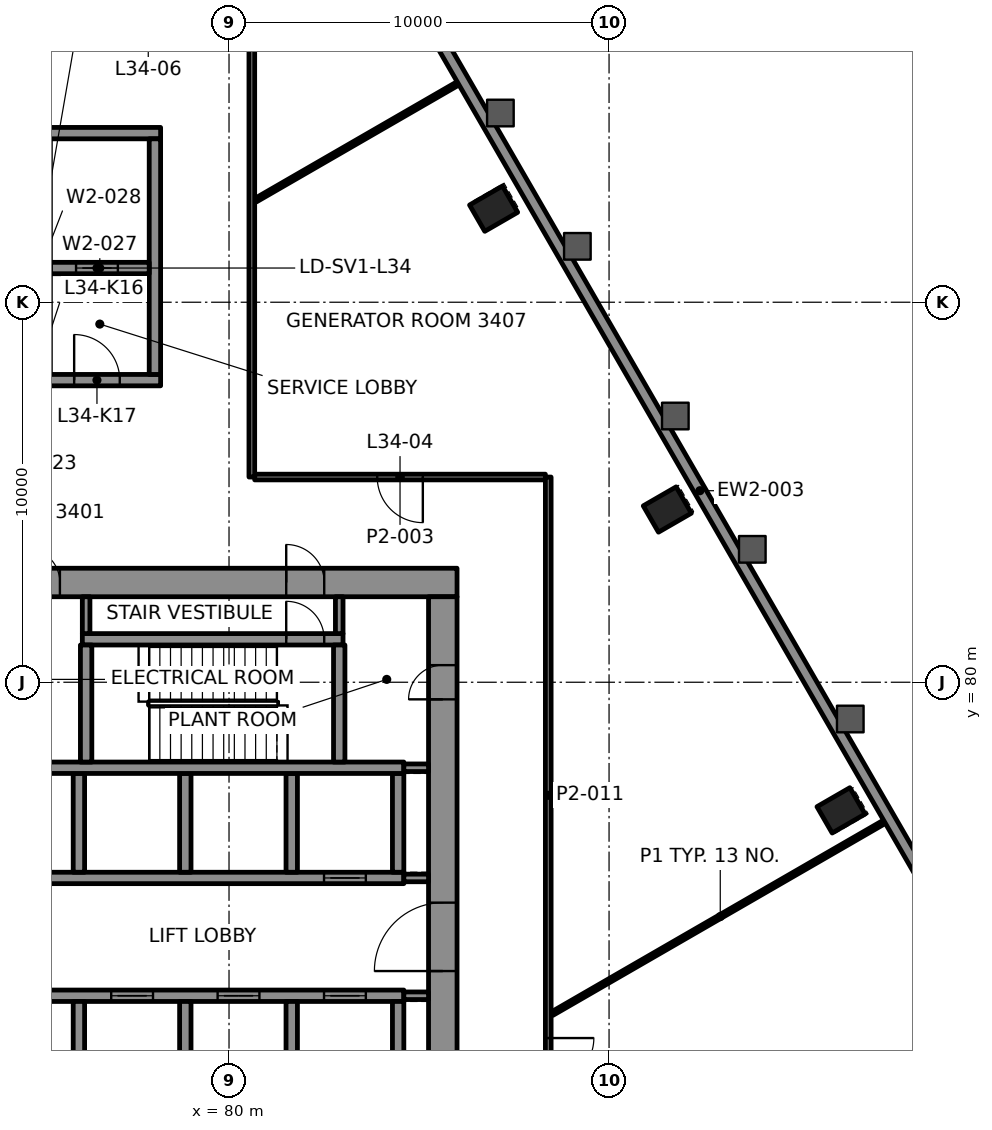
"""IFC4 building model, lengths in metres.
Left out: names, types, materials, properties, quantities, classifications, styles, units other than length and angle.
Written with IfcOpenShell. Run it as: python <this file> out.ifc"""

import sys

from ifc_helpers import new_model, si_unit, direction, frame, frame_2d, origin, origin_2d, place, context, subcontext, project, spatial, rectangle, hollow_rectangle, extrude, element, fill, save


model = new_model("IFC4")
c1 = context("Model", 3, precision=1e-05, world=origin(), true_north=direction((0.0, 1.0)))
c2 = subcontext(c1, "Body", "Model", "MODEL_VIEW")
j1 = project(units=[si_unit("LENGTHUNIT", "METRE"), si_unit("PLANEANGLEUNIT", "RADIAN")], contexts=[c1])
p1 = place(None, origin())
s1 = spatial("IfcSite", under=j1, at=p1, CompositionType="ELEMENT")
p2 = place(p1, origin())
s2 = spatial("IfcBuilding", under=s1, at=p2, CompositionType="ELEMENT")
p3 = place(p2, frame((0.0, 0.0, 151.3)))
s3 = spatial("IfcBuildingStorey", under=s2, at=p3, CompositionType="ELEMENT", Elevation=151.3)
for number, where, z_axis, x_axis in (
    (1, (96.104, 76.628, -0.0), (0.0, 0.0, 1.0), (-0.5, 0.866, 0.0)),
    (2, (91.533, 84.545, -0.0), (0.0, 0.0, 1.0), (-0.5, 0.866, 0.0)),
    (3, (86.962, 92.462, -0.0), (0.0, 0.0, 1.0), (-0.5, 0.866, 0.0)),
):
    element("IfcColumn", number, at=place(p3, frame(where, z_axis=z_axis, x_axis=x_axis)), inside=s3, PredefinedType="COLUMN", context=c2, shape_type="SweptSolid", body=[
        extrude(hollow_rectangle(XDim=0.8, YDim=1.0, WallThickness=0.05, at=origin_2d()), origin(), (0.0, 0.0, 1.0), 4.5),
    ])
p4 = place(p3, frame((64.0, 82.625, 0.0), z_axis=(0.0, 0.0, 1.0), x_axis=(1.0, 0.0, 0.0)))
e4 = element("IfcWall", 4, at=p4, inside=s3, PredefinedType="SHEAR", context=c2, shape_type="SweptSolid", body=[
    extrude(rectangle(XDim=22.0, YDim=0.75, at=frame_2d((11.0, 0.0))), origin(), (0.0, 0.0, 1.0), 4.3),
])
p5 = place(p4, frame((3.695, 0.0, 0.0)))
e5 = element("IfcOpeningElement", 5, at=p5, cuts=e4, PredefinedType="OPENING", context=c2, shape_type="SweptSolid", body=[
    extrude(rectangle(XDim=1.0, YDim=2.1, at=frame_2d((0.5, 1.05))), frame((0.0, 0.385, 0.0), z_axis=(0.0, -1.0, 0.0), x_axis=(1.0, 0.0, 0.0)), (0.0, 0.0, 1.0), 0.77),
])
p6 = place(p4, frame((17.505, 0.0, 0.0)))
e6 = element("IfcOpeningElement", 6, at=p6, cuts=e4, PredefinedType="OPENING", context=c2, shape_type="SweptSolid", body=[
    extrude(rectangle(XDim=1.0, YDim=2.1, at=frame_2d((0.5, 1.05))), frame((0.0, 0.385, 0.0), z_axis=(0.0, -1.0, 0.0), x_axis=(1.0, 0.0, 0.0)), (0.0, 0.0, 1.0), 0.77),
])
p7 = place(p4, frame((10.65, 0.0, 0.0)))
e7 = element("IfcOpeningElement", 7, at=p7, cuts=e4, PredefinedType="OPENING", context=c2, shape_type="SweptSolid", body=[
    extrude(rectangle(XDim=0.9, YDim=2.1, at=frame_2d((0.45, 1.05))), frame((0.0, 0.385, 0.0), z_axis=(0.0, -1.0, 0.0), x_axis=(1.0, 0.0, 0.0)), (0.0, 0.0, 1.0), 0.77),
])
p8 = place(p3, frame((85.625, 67.75, 0.0), z_axis=(0.0, 0.0, 1.0), x_axis=(0.0, 1.0, 0.0)))
e8 = element("IfcWall", 8, at=p8, inside=s3, PredefinedType="SHEAR", context=c2, shape_type="SweptSolid", body=[
    extrude(rectangle(XDim=14.5, YDim=0.75, at=frame_2d((7.25, 0.0))), origin(), (0.0, 0.0, 1.0), 4.3),
])
p9 = place(p8, frame((4.65, 0.0, 0.0)))
e9 = element("IfcOpeningElement", 9, at=p9, cuts=e8, PredefinedType="OPENING", context=c2, shape_type="SweptSolid", body=[
    extrude(rectangle(XDim=1.8, YDim=2.1, at=frame_2d((0.9, 1.05))), frame((0.0, 0.385, 0.0), z_axis=(0.0, -1.0, 0.0), x_axis=(1.0, 0.0, 0.0)), (0.0, 0.0, 1.0), 0.77),
])
p10 = place(p8, frame((11.8, 0.0, 0.0)))
e10 = element("IfcOpeningElement", 10, at=p10, cuts=e8, PredefinedType="OPENING", context=c2, shape_type="SweptSolid", body=[
    extrude(rectangle(XDim=0.9, YDim=2.1, at=frame_2d((0.45, 1.05))), frame((0.0, 0.385, 0.0), z_axis=(0.0, -1.0, 0.0), x_axis=(1.0, 0.0, 0.0)), (0.0, 0.0, 1.0), 0.77),
])
p11 = place(p3, frame((70.3, 71.75, 0.0), z_axis=(0.0, 0.0, 1.0), x_axis=(1.0, 0.0, 0.0)))
e11 = element("IfcWall", 11, at=p11, inside=s3, PredefinedType="SHEAR", context=c2, shape_type="SweptSolid", body=[
    extrude(rectangle(XDim=14.3, YDim=0.3, at=frame_2d((7.15, 0.0))), origin(), (0.0, 0.0, 1.0), 4.3),
])
p12 = place(p11, frame((1.0, 0.0, 0.0)))
e12 = element("IfcOpeningElement", 12, at=p12, cuts=e11, PredefinedType="OPENING", context=c2, shape_type="SweptSolid", body=[
    extrude(rectangle(XDim=1.1, YDim=2.1, at=frame_2d((0.55, 1.05))), frame((0.0, 0.16, 0.0), z_axis=(0.0, -1.0, 0.0), x_axis=(1.0, 0.0, 0.0)), (0.0, 0.0, 1.0), 0.32),
])
p13 = place(p11, frame((3.8, 0.0, 0.0)))
e13 = element("IfcOpeningElement", 13, at=p13, cuts=e11, PredefinedType="OPENING", context=c2, shape_type="SweptSolid", body=[
    extrude(rectangle(XDim=1.1, YDim=2.1, at=frame_2d((0.55, 1.05))), frame((0.0, 0.16, 0.0), z_axis=(0.0, -1.0, 0.0), x_axis=(1.0, 0.0, 0.0)), (0.0, 0.0, 1.0), 0.32),
])
p14 = place(p11, frame((6.6, 0.0, 0.0)))
e14 = element("IfcOpeningElement", 14, at=p14, cuts=e11, PredefinedType="OPENING", context=c2, shape_type="SweptSolid", body=[
    extrude(rectangle(XDim=1.1, YDim=2.1, at=frame_2d((0.55, 1.05))), frame((0.0, 0.16, 0.0), z_axis=(0.0, -1.0, 0.0), x_axis=(1.0, 0.0, 0.0)), (0.0, 0.0, 1.0), 0.32),
])
p15 = place(p11, frame((9.4, 0.0, 0.0)))
e15 = element("IfcOpeningElement", 15, at=p15, cuts=e11, PredefinedType="OPENING", context=c2, shape_type="SweptSolid", body=[
    extrude(rectangle(XDim=1.1, YDim=2.1, at=frame_2d((0.55, 1.05))), frame((0.0, 0.16, 0.0), z_axis=(0.0, -1.0, 0.0), x_axis=(1.0, 0.0, 0.0)), (0.0, 0.0, 1.0), 0.32),
])
p16 = place(p11, frame((12.2, 0.0, 0.0)))
e16 = element("IfcOpeningElement", 16, at=p16, cuts=e11, PredefinedType="OPENING", context=c2, shape_type="SweptSolid", body=[
    extrude(rectangle(XDim=1.1, YDim=2.1, at=frame_2d((0.55, 1.05))), frame((0.0, 0.16, 0.0), z_axis=(0.0, -1.0, 0.0), x_axis=(1.0, 0.0, 0.0)), (0.0, 0.0, 1.0), 0.32),
])
p17 = place(p3, frame((70.3, 74.85, 0.0), z_axis=(0.0, 0.0, 1.0), x_axis=(1.0, 0.0, 0.0)))
e17 = element("IfcWall", 17, at=p17, inside=s3, PredefinedType="SHEAR", context=c2, shape_type="SweptSolid", body=[
    extrude(rectangle(XDim=14.3, YDim=0.3, at=frame_2d((7.15, 0.0))), origin(), (0.0, 0.0, 1.0), 4.3),
])
p18 = place(p17, frame((3.8, 0.0, 0.0)))
e18 = element("IfcOpeningElement", 18, at=p18, cuts=e17, PredefinedType="OPENING", context=c2, shape_type="SweptSolid", body=[
    extrude(rectangle(XDim=1.1, YDim=2.1, at=frame_2d((0.55, 1.05))), frame((0.0, 0.16, 0.0), z_axis=(0.0, -1.0, 0.0), x_axis=(1.0, 0.0, 0.0)), (0.0, 0.0, 1.0), 0.32),
])
p19 = place(p17, frame((12.2, 0.0, 0.0)))
e19 = element("IfcOpeningElement", 19, at=p19, cuts=e17, PredefinedType="OPENING", context=c2, shape_type="SweptSolid", body=[
    extrude(rectangle(XDim=1.1, YDim=2.1, at=frame_2d((0.55, 1.05))), frame((0.0, 0.16, 0.0), z_axis=(0.0, -1.0, 0.0), x_axis=(1.0, 0.0, 0.0)), (0.0, 0.0, 1.0), 0.32),
])
for number, where, z_axis, x_axis in (
    (20, (76.05, 69.0, 0.0), (0.0, 0.0, 1.0), (0.0, 1.0, 0.0)),
    (21, (76.05, 75.0, 0.0), (0.0, 0.0, 1.0), (0.0, 1.0, 0.0)),
    (22, (78.85, 69.0, 0.0), (0.0, 0.0, 1.0), (0.0, 1.0, 0.0)),
    (23, (78.85, 75.0, 0.0), (0.0, 0.0, 1.0), (0.0, 1.0, 0.0)),
    (24, (81.65, 69.0, 0.0), (0.0, 0.0, 1.0), (0.0, 1.0, 0.0)),
    (25, (81.65, 75.0, 0.0), (0.0, 0.0, 1.0), (0.0, 1.0, 0.0)),
    (26, (84.45, 69.0, 0.0), (0.0, 0.0, 1.0), (0.0, 1.0, 0.0)),
    (27, (84.45, 75.0, 0.0), (0.0, 0.0, 1.0), (0.0, 1.0, 0.0)),
):
    element("IfcWall", number, at=place(p3, frame(where, z_axis=z_axis, x_axis=x_axis)), inside=s3, PredefinedType="SHEAR", context=c2, shape_type="SweptSolid", body=[
        extrude(rectangle(XDim=2.6, YDim=0.3, at=frame_2d((1.3, 0.0))), origin(), (0.0, 0.0, 1.0), 4.3),
    ])
p20 = place(p3, frame((67.15, 77.75, 0.0), z_axis=(0.0, 0.0, 1.0), x_axis=(1.0, 0.0, 0.0)))
e28 = element("IfcWall", 28, at=p20, inside=s3, PredefinedType="SHEAR", context=c2, shape_type="SweptSolid", body=[
    extrude(rectangle(XDim=17.45, YDim=0.3, at=frame_2d((8.725, 0.0))), origin(), (0.0, 0.0, 1.0), 4.3),
])
p21 = place(p20, frame((0.545, 0.0, 0.0)))
e29 = element("IfcOpeningElement", 29, at=p21, cuts=e28, PredefinedType="OPENING", context=c2, shape_type="SweptSolid", body=[
    extrude(rectangle(XDim=1.0, YDim=2.1, at=frame_2d((0.5, 1.05))), frame((0.0, 0.16, 0.0), z_axis=(0.0, -1.0, 0.0), x_axis=(1.0, 0.0, 0.0)), (0.0, 0.0, 1.0), 0.32),
])
p22 = place(p3, frame((76.14, 81.13, 0.0), z_axis=(0.0, 0.0, 1.0), x_axis=(1.0, 0.0, 0.0)))
e30 = element("IfcWall", 30, at=p22, inside=s3, PredefinedType="SHEAR", context=c2, shape_type="SweptSolid", body=[
    extrude(rectangle(XDim=6.86, YDim=0.3, at=frame_2d((3.43, 0.0))), origin(), (0.0, 0.0, 1.0), 4.3),
])
p23 = place(p22, frame((5.365, 0.0, 0.0)))
e31 = element("IfcOpeningElement", 31, at=p23, cuts=e30, PredefinedType="OPENING", context=c2, shape_type="SweptSolid", body=[
    extrude(rectangle(XDim=1.0, YDim=2.1, at=frame_2d((0.5, 1.05))), frame((0.0, 0.16, 0.0), z_axis=(0.0, -1.0, 0.0), x_axis=(1.0, 0.0, 0.0)), (0.0, 0.0, 1.0), 0.32),
])
for number, where, z_axis, x_axis in (
    (32, (76.24, 77.9, 0.0), (0.0, 0.0, 1.0), (0.0, 1.0, 0.0)),
    (33, (82.9, 77.9, 0.0), (0.0, 0.0, 1.0), (0.0, 1.0, 0.0)),
):
    element("IfcWall", number, at=place(p3, frame(where, z_axis=z_axis, x_axis=x_axis)), inside=s3, PredefinedType="SHEAR", context=c2, shape_type="SweptSolid", body=[
        extrude(rectangle(XDim=3.08, YDim=0.3, at=frame_2d((1.54, 0.0))), origin(), (0.0, 0.0, 1.0), 4.3),
    ])
p24 = place(p3, frame((71.8, 87.95, 0.0), z_axis=(0.0, 0.0, 1.0), x_axis=(1.0, 0.0, 0.0)))
e34 = element("IfcWall", 34, at=p24, inside=s3, PredefinedType="SHEAR", context=c2, shape_type="SweptSolid", body=[
    extrude(rectangle(XDim=6.4, YDim=0.3, at=frame_2d((3.2, 0.0))), origin(), (0.0, 0.0, 1.0), 4.3),
])
p25 = place(p24, frame((1.325, 0.0, 0.0)))
e35 = element("IfcOpeningElement", 35, at=p25, cuts=e34, PredefinedType="OPENING", context=c2, shape_type="SweptSolid", body=[
    extrude(rectangle(XDim=1.0, YDim=2.1, at=frame_2d((0.5, 1.05))), frame((0.0, 0.16, 0.0), z_axis=(0.0, -1.0, 0.0), x_axis=(1.0, 0.0, 0.0)), (0.0, 0.0, 1.0), 0.32),
])
p26 = place(p24, frame((4.125, 0.0, 0.0)))
e36 = element("IfcOpeningElement", 36, at=p26, cuts=e34, PredefinedType="OPENING", context=c2, shape_type="SweptSolid", body=[
    extrude(rectangle(XDim=1.2, YDim=2.1, at=frame_2d((0.6, 1.05))), frame((0.0, 0.16, 0.0), z_axis=(0.0, -1.0, 0.0), x_axis=(1.0, 0.0, 0.0)), (0.0, 0.0, 1.0), 0.32),
])
p27 = place(p3, frame((71.8, 94.45, 0.0), z_axis=(0.0, 0.0, 1.0), x_axis=(1.0, 0.0, 0.0)))
e37 = element("IfcWall", 37, at=p27, inside=s3, PredefinedType="SHEAR", context=c2, shape_type="SweptSolid", body=[
    extrude(rectangle(XDim=6.4, YDim=0.3, at=frame_2d((3.2, 0.0))), origin(), (0.0, 0.0, 1.0), 4.3),
])
p28 = place(p3, frame((78.05, 88.1, 0.0), z_axis=(0.0, 0.0, 1.0), x_axis=(0.0, 1.0, 0.0)))
e38 = element("IfcWall", 38, at=p28, inside=s3, PredefinedType="SHEAR", context=c2, shape_type="SweptSolid", body=[
    extrude(rectangle(XDim=6.2, YDim=0.3, at=frame_2d((3.1, 0.0))), origin(), (0.0, 0.0, 1.0), 4.3),
])
p29 = place(p3, frame((75.3, 90.9, 0.0), z_axis=(0.0, 0.0, 1.0), x_axis=(1.0, 0.0, 0.0)))
e39 = element("IfcWall", 39, at=p29, inside=s3, PredefinedType="SHEAR", context=c2, shape_type="SweptSolid", body=[
    extrude(rectangle(XDim=2.6, YDim=0.3, at=frame_2d((1.3, 0.0))), origin(), (0.0, 0.0, 1.0), 4.3),
])
p30 = place(p29, frame((0.675, 0.0, 0.0)))
e40 = element("IfcOpeningElement", 40, at=p30, cuts=e39, PredefinedType="OPENING", context=c2, shape_type="SweptSolid", body=[
    extrude(rectangle(XDim=1.1, YDim=2.1, at=frame_2d((0.55, 1.05))), frame((0.0, 0.16, 0.0), z_axis=(0.0, -1.0, 0.0), x_axis=(1.0, 0.0, 0.0)), (0.0, 0.0, 1.0), 0.32),
])
p31 = place(p3, frame((88.324, 85.4, 0.0), z_axis=(0.0, 0.0, 1.0), x_axis=(-1.0, 0.0, 0.0)))
e41 = element("IfcWall", 41, at=p31, inside=s3, PredefinedType="PARTITIONING", context=c2, shape_type="SweptSolid", body=[
    extrude(rectangle(XDim=7.649, YDim=0.15, at=frame_2d((3.825, 0.0))), origin(), (0.0, 0.0, 1.0), 3.7),
])
p32 = place(p31, frame((3.225, 0.0, 0.0)))
e42 = element("IfcOpeningElement", 42, at=p32, cuts=e41, PredefinedType="OPENING", context=c2, shape_type="SweptSolid", body=[
    extrude(rectangle(XDim=1.2, YDim=2.1, at=frame_2d((0.6, 1.05))), frame((0.0, 0.085, 0.0), z_axis=(0.0, -1.0, 0.0), x_axis=(1.0, 0.0, 0.0)), (0.0, 0.0, 1.0), 0.17),
])
p33 = place(p3, frame((88.501, 71.279, 0.0), z_axis=(0.0, 0.0, 1.0), x_axis=(0.866018885385, 0.500011290028, 0.0)))
e43 = element("IfcWall", 43, at=p33, inside=s3, PredefinedType="PARTITIONING", context=c2, shape_type="SweptSolid", body=[
    extrude(rectangle(XDim=10.219, YDim=0.1, at=frame_2d((5.109, 0.0))), origin(), (0.0, 0.0, 1.0), 3.7),
])
p34 = place(p3, frame((80.701, 92.686, 0.0), z_axis=(0.0, 0.0, 1.0), x_axis=(0.866025438137, 0.4999999405, 0.0)))
e44 = element("IfcWall", 44, at=p34, inside=s3, PredefinedType="PARTITIONING", context=c2, shape_type="SweptSolid", body=[
    extrude(rectangle(XDim=6.271, YDim=0.1, at=frame_2d((3.135, 0.0))), origin(), (0.0, 0.0, 1.0), 3.7),
])
p35 = place(p3, frame((88.4, 85.399, 0.0), z_axis=(0.0, 0.0, 1.0), x_axis=(0.0, -1.0, 0.0)))
e45 = element("IfcWall", 45, at=p35, inside=s3, PredefinedType="PARTITIONING", context=c2, shape_type="SweptSolid", body=[
    extrude(rectangle(XDim=16.75, YDim=0.15, at=frame_2d((8.375, 0.0))), origin(), (0.0, 0.0, 1.0), 3.7),
])
p36 = place(p35, frame((14.763, 0.0, 0.0)))
e46 = element("IfcOpeningElement", 46, at=p36, cuts=e45, PredefinedType="OPENING", context=c2, shape_type="SweptSolid", body=[
    extrude(rectangle(XDim=1.2, YDim=2.1, at=frame_2d((0.6, 1.05))), frame((0.0, 0.085, 0.0), z_axis=(0.0, -1.0, 0.0), x_axis=(1.0, 0.0, 0.0)), (0.0, 0.0, 1.0), 0.17),
])
p37 = place(p3, frame((80.6, 85.4, 0.0), z_axis=(0.0, 0.0, 1.0), x_axis=(0.0, 1.0, 0.0)))
e47 = element("IfcWall", 47, at=p37, inside=s3, PredefinedType="PARTITIONING", context=c2, shape_type="SweptSolid", body=[
    extrude(rectangle(XDim=11.6, YDim=0.15, at=frame_2d((5.8, 0.0))), origin(), (0.0, 0.0, 1.0), 3.7),
])
p38 = place(p3, frame((106.129, 61.245, 0.0), z_axis=(0.0, 0.0, 1.0), x_axis=(-0.500000750612, 0.866024970418, 0.0)))
e48 = element("IfcWall", 48, at=p38, inside=s3, PredefinedType="SOLIDWALL", context=c2, shape_type="SweptSolid", body=[
    extrude(rectangle(XDim=54.954, YDim=0.3, at=frame_2d((27.477, 0.0))), origin(), (0.0, 0.0, 1.0), 4.3),
])
p39 = place(p38, frame((2.96, 0.0, 0.8)))
e49 = element("IfcOpeningElement", 49, at=p39, cuts=e48, PredefinedType="OPENING", context=c2, shape_type="SweptSolid", body=[
    extrude(rectangle(XDim=3.0, YDim=2.4, at=frame_2d((1.5, 1.2))), frame((0.0, 0.16, 0.0), z_axis=(0.0, -1.0, 0.0), x_axis=(1.0, 0.0, 0.0)), (0.0, 0.0, 1.0), 0.32),
])
p40 = place(p38, frame((48.994, 0.0, 0.8)))
e50 = element("IfcOpeningElement", 50, at=p40, cuts=e48, PredefinedType="OPENING", context=c2, shape_type="SweptSolid", body=[
    extrude(rectangle(XDim=3.0, YDim=2.4, at=frame_2d((1.5, 1.2))), frame((0.0, 0.16, 0.0), z_axis=(0.0, -1.0, 0.0), x_axis=(1.0, 0.0, 0.0)), (0.0, 0.0, 1.0), 0.32),
])
for number, where, z_axis, x_axis in (
    (51, (84.6, 71.75, 0.0), (0.0, 0.0, 1.0), (1.0, 0.0, 0.0)),
    (52, (84.6, 74.85, 0.0), (0.0, 0.0, 1.0), (1.0, 0.0, 0.0)),
    (53, (84.6, 77.75, 0.0), (0.0, 0.0, 1.0), (1.0, 0.0, 0.0)),
):
    element("IfcWall", number, at=place(p3, frame(where, z_axis=z_axis, x_axis=x_axis)), inside=s3, PredefinedType="PARTITIONING", context=c2, shape_type="SweptSolid", body=[
        extrude(rectangle(XDim=0.65, YDim=0.2, at=frame_2d((0.325, 0.0))), origin(), (0.0, 0.0, 1.0), 4.3),
    ])
for number, where, z_axis, x_axis in (
    (54, (76.24, 81.28, 0.0), (0.0, 0.0, 1.0), (0.0, 1.0, 0.0)),
    (55, (82.9, 81.28, 0.0), (0.0, 0.0, 1.0), (0.0, 1.0, 0.0)),
):
    element("IfcWall", number, at=place(p3, frame(where, z_axis=z_axis, x_axis=x_axis)), inside=s3, PredefinedType="PARTITIONING", context=c2, shape_type="SweptSolid", body=[
        extrude(rectangle(XDim=0.97, YDim=0.2, at=frame_2d((0.485, 0.0))), origin(), (0.0, 0.0, 1.0), 4.3),
    ])
p41 = place(p32, origin())
e56 = element("IfcDoor", 56, at=p41, inside=s3, OperationType="DOUBLE_DOOR_SINGLE_SWING", PredefinedType="DOOR", context=c2, shape_type="SweptSolid", body=[
    extrude(rectangle(XDim=1.2, YDim=2.1, at=frame_2d((0.6, 1.05))), frame((0.0, 0.025, 0.0), z_axis=(0.0, -1.0, 0.0), x_axis=(1.0, 0.0, 0.0)), (0.0, 0.0, 1.0), 0.05),
])
fill(e42, e56)
p42 = place(p36, origin())
e57 = element("IfcDoor", 57, at=p42, inside=s3, OperationType="DOUBLE_DOOR_SINGLE_SWING", PredefinedType="DOOR", context=c2, shape_type="SweptSolid", body=[
    extrude(rectangle(XDim=1.2, YDim=2.1, at=frame_2d((0.6, 1.05))), frame((0.0, 0.025, 0.0), z_axis=(0.0, -1.0, 0.0), x_axis=(1.0, 0.0, 0.0)), (0.0, 0.0, 1.0), 0.05),
])
fill(e46, e57)
p43 = place(p14, origin())
e58 = element("IfcDoor", 58, at=p43, inside=s3, OperationType="DOUBLE_DOOR_SLIDING", PredefinedType="DOOR", context=c2, shape_type="SweptSolid", body=[
    extrude(rectangle(XDim=1.1, YDim=2.1, at=frame_2d((0.55, 1.05))), frame((0.0, 0.025, 0.0), z_axis=(0.0, -1.0, 0.0), x_axis=(1.0, 0.0, 0.0)), (0.0, 0.0, 1.0), 0.05),
])
fill(e14, e58)
p44 = place(p15, origin())
e59 = element("IfcDoor", 59, at=p44, inside=s3, OperationType="DOUBLE_DOOR_SLIDING", PredefinedType="DOOR", context=c2, shape_type="SweptSolid", body=[
    extrude(rectangle(XDim=1.1, YDim=2.1, at=frame_2d((0.55, 1.05))), frame((0.0, 0.025, 0.0), z_axis=(0.0, -1.0, 0.0), x_axis=(1.0, 0.0, 0.0)), (0.0, 0.0, 1.0), 0.05),
])
fill(e15, e59)
p45 = place(p16, origin())
e60 = element("IfcDoor", 60, at=p45, inside=s3, OperationType="DOUBLE_DOOR_SLIDING", PredefinedType="DOOR", context=c2, shape_type="SweptSolid", body=[
    extrude(rectangle(XDim=1.1, YDim=2.1, at=frame_2d((0.55, 1.05))), frame((0.0, 0.025, 0.0), z_axis=(0.0, -1.0, 0.0), x_axis=(1.0, 0.0, 0.0)), (0.0, 0.0, 1.0), 0.05),
])
fill(e16, e60)
p46 = place(p19, origin())
e61 = element("IfcDoor", 61, at=p46, inside=s3, OperationType="DOUBLE_DOOR_SLIDING", PredefinedType="DOOR", context=c2, shape_type="SweptSolid", body=[
    extrude(rectangle(XDim=1.1, YDim=2.1, at=frame_2d((0.55, 1.05))), frame((0.0, 0.025, 0.0), z_axis=(0.0, -1.0, 0.0), x_axis=(1.0, 0.0, 0.0)), (0.0, 0.0, 1.0), 0.05),
])
fill(e19, e61)
p47 = place(p30, origin())
e62 = element("IfcDoor", 62, at=p47, inside=s3, OperationType="DOUBLE_DOOR_SLIDING", PredefinedType="DOOR", context=c2, shape_type="SweptSolid", body=[
    extrude(rectangle(XDim=1.1, YDim=2.1, at=frame_2d((0.55, 1.05))), frame((0.0, 0.025, 0.0), z_axis=(0.0, -1.0, 0.0), x_axis=(1.0, 0.0, 0.0)), (0.0, 0.0, 1.0), 0.05),
])
fill(e40, e62)
p48 = place(p23, origin())
e63 = element("IfcDoor", 63, at=p48, inside=s3, OperationType="SINGLE_SWING_RIGHT", PredefinedType="DOOR", context=c2, shape_type="SweptSolid", body=[
    extrude(rectangle(XDim=1.0, YDim=2.1, at=frame_2d((0.5, 1.05))), frame((0.0, 0.025, 0.0), z_axis=(0.0, -1.0, 0.0), x_axis=(1.0, 0.0, 0.0)), (0.0, 0.0, 1.0), 0.05),
])
fill(e31, e63)
p49 = place(p6, origin())
e64 = element("IfcDoor", 64, at=p49, inside=s3, OperationType="SINGLE_SWING_LEFT", PredefinedType="DOOR", context=c2, shape_type="SweptSolid", body=[
    extrude(rectangle(XDim=1.0, YDim=2.1, at=frame_2d((0.5, 1.05))), frame((0.0, 0.095, 0.0), z_axis=(0.0, -1.0, 0.0), x_axis=(1.0, 0.0, 0.0)), (0.0, 0.0, 1.0), 0.19),
])
fill(e6, e64)
p50 = place(p26, origin())
e65 = element("IfcDoor", 65, at=p50, inside=s3, OperationType="SINGLE_SWING_RIGHT", PredefinedType="DOOR", context=c2, shape_type="SweptSolid", body=[
    extrude(rectangle(XDim=1.2, YDim=2.1, at=frame_2d((0.6, 1.05))), frame((0.0, 0.025, 0.0), z_axis=(0.0, -1.0, 0.0), x_axis=(1.0, 0.0, 0.0)), (0.0, 0.0, 1.0), 0.05),
])
fill(e36, e65)
p51 = place(p9, origin())
e66 = element("IfcDoor", 66, at=p51, inside=s3, OperationType="SINGLE_SWING_RIGHT", PredefinedType="DOOR", context=c2, shape_type="SweptSolid", body=[
    extrude(rectangle(XDim=1.8, YDim=2.1, at=frame_2d((0.9, 1.05))), frame((0.0, 0.095, 0.0), z_axis=(0.0, -1.0, 0.0), x_axis=(1.0, 0.0, 0.0)), (0.0, 0.0, 1.0), 0.19),
])
fill(e9, e66)
p52 = place(p7, origin())
e67 = element("IfcDoor", 67, at=p52, inside=s3, OperationType="SINGLE_SWING_RIGHT", PredefinedType="DOOR", context=c2, shape_type="SweptSolid", body=[
    extrude(rectangle(XDim=0.9, YDim=2.1, at=frame_2d((0.45, 1.05))), frame((0.0, 0.095, 0.0), z_axis=(0.0, -1.0, 0.0), x_axis=(1.0, 0.0, 0.0)), (0.0, 0.0, 1.0), 0.19),
])
fill(e7, e67)
p53 = place(p10, origin())
e68 = element("IfcDoor", 68, at=p53, inside=s3, OperationType="SINGLE_SWING_LEFT", PredefinedType="DOOR", context=c2, shape_type="SweptSolid", body=[
    extrude(rectangle(XDim=0.9, YDim=2.1, at=frame_2d((0.45, 1.05))), frame((0.0, 0.095, 0.0), z_axis=(0.0, -1.0, 0.0), x_axis=(1.0, 0.0, 0.0)), (0.0, 0.0, 1.0), 0.19),
])
fill(e10, e68)
save(model, sys.argv[1])
